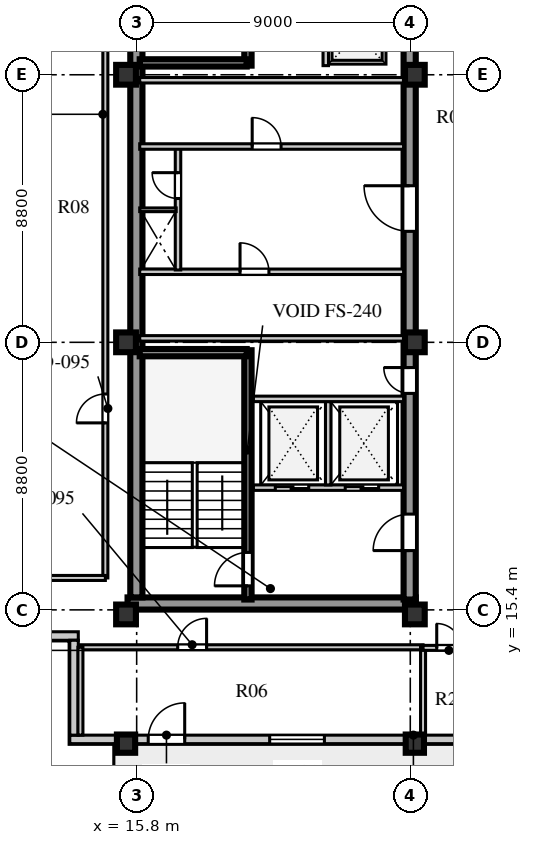
"""IFC4 building model, lengths in metres.
Left out: names, types, materials, properties, quantities, classifications, styles, units other than length and angle.
Written with IfcOpenShell. Run it as: python <this file> out.ifc"""

import sys

from ifc_helpers import new_model, si_unit, direction, frame, frame_2d, origin, origin_2d, place, context, subcontext, project, spatial, rectangle, extrude, element, fill, save


model = new_model("IFC4")
c1 = context("Model", 3, precision=1e-05, world=origin(), true_north=direction((0.0, 1.0)))
c2 = subcontext(c1, "Body", "Model", "MODEL_VIEW")
j1 = project(units=[si_unit("LENGTHUNIT", "METRE"), si_unit("PLANEANGLEUNIT", "RADIAN")], contexts=[c1])
p1 = place(None, origin())
s1 = spatial("IfcSite", under=j1, at=p1, CompositionType="ELEMENT")
p2 = place(p1, origin())
s2 = spatial("IfcBuilding", under=s1, at=p2, CompositionType="ELEMENT")
p3 = place(p2, frame((0.0, 0.0, 327.7)))
s3 = spatial("IfcBuildingStorey", under=s2, at=p3, CompositionType="ELEMENT", Elevation=327.7)
p4 = place(p3, frame((15.5, 15.61, 0.0), z_axis=(0.0, 0.0, 1.0), x_axis=(1.0, 0.0, 0.0)))
e1 = element("IfcWall", 1, at=p4, inside=s3, PredefinedType="SHEAR", context=c2, shape_type="SweptSolid", body=[
    extrude(rectangle(XDim=9.48, YDim=0.4, at=frame_2d((4.74, 0.0))), origin(), (0.0, 0.0, 1.0), 3.56),
])
p5 = place(p3, frame((15.79, 15.81, 0.0), z_axis=(0.0, 0.0, 1.0), x_axis=(0.0, 1.0, 0.0)))
e2 = element("IfcWall", 2, at=p5, inside=s3, PredefinedType="SHEAR", context=c2, shape_type="SweptSolid", body=[
    extrude(rectangle(XDim=25.63, YDim=0.4, at=frame_2d((12.815, 0.0))), origin(), (0.0, 0.0, 1.0), 3.56),
])
p6 = place(p3, frame((24.78, 15.74, 0.0), z_axis=(0.0, 0.0, 1.0), x_axis=(0.0, 1.0, 0.0)))
e3 = element("IfcWall", 3, at=p6, inside=s3, PredefinedType="SHEAR", context=c2, shape_type="SweptSolid", body=[
    extrude(rectangle(XDim=25.76, YDim=0.4, at=frame_2d((12.88, 0.0))), origin(), (0.0, 0.0, 1.0), 3.56),
])
p7 = place(p6, frame((1.61, 0.0, 0.0)))
e4 = element("IfcOpeningElement", 4, at=p7, cuts=e3, PredefinedType="OPENING", context=c2, shape_type="SweptSolid", body=[
    extrude(rectangle(XDim=1.2, YDim=2.1, at=frame_2d((0.6, 1.05))), frame((0.0, 0.21, 0.0), z_axis=(0.0, -1.0, 0.0), x_axis=(1.0, 0.0, 0.0)), (0.0, 0.0, 1.0), 0.42),
])
p8 = place(p6, frame((6.78, 0.0, 0.0)))
e5 = element("IfcOpeningElement", 5, at=p8, cuts=e3, PredefinedType="OPENING", context=c2, shape_type="SweptSolid", body=[
    extrude(rectangle(XDim=0.85, YDim=2.06, at=frame_2d((0.425, 1.03))), frame((0.0, 0.21, 0.0), z_axis=(0.0, -1.0, 0.0), x_axis=(1.0, 0.0, 0.0)), (0.0, 0.0, 1.0), 0.42),
])
p9 = place(p6, frame((12.11, 0.0, 0.0)))
e6 = element("IfcOpeningElement", 6, at=p9, cuts=e3, PredefinedType="OPENING", context=c2, shape_type="SweptSolid", body=[
    extrude(rectangle(XDim=1.5, YDim=2.12, at=frame_2d((0.75, 1.06))), frame((0.0, 0.21, 0.0), z_axis=(0.0, -1.0, 0.0), x_axis=(1.0, 0.0, 0.0)), (0.0, 0.0, 1.0), 0.42),
])
p10 = place(p6, frame((20.11, 0.0, 0.0)))
e7 = element("IfcOpeningElement", 7, at=p10, cuts=e3, PredefinedType="OPENING", context=c2, shape_type="SweptSolid", body=[
    extrude(rectangle(XDim=1.2, YDim=2.12, at=frame_2d((0.6, 1.06))), frame((0.0, 0.21, 0.0), z_axis=(0.0, -1.0, 0.0), x_axis=(1.0, 0.0, 0.0)), (0.0, 0.0, 1.0), 0.42),
])
p11 = place(p6, frame((24.01, 0.0, 0.0)))
e8 = element("IfcOpeningElement", 8, at=p11, cuts=e3, PredefinedType="OPENING", context=c2, shape_type="SweptSolid", body=[
    extrude(rectangle(XDim=0.95, YDim=2.1, at=frame_2d((0.475, 1.05))), frame((0.0, 0.21, 0.0), z_axis=(0.0, -1.0, 0.0), x_axis=(1.0, 0.0, 0.0)), (0.0, 0.0, 1.0), 0.42),
])
for number, where, z_axis, x_axis in (
    (9, (15.45, 15.25, 0.0), (0.0, 0.0, 1.0), (1.0, 0.0, 0.0)),
    (10, (15.45, 24.2, 0.0), (0.0, 0.0, 1.0), (1.0, 0.0, 0.0)),
    (11, (15.45, 33.0, 0.0), (0.0, 0.0, 1.0), (1.0, 0.0, 0.0)),
    (12, (24.95, 15.25, 0.0), (0.0, 0.0, 1.0), (1.0, 0.0, 0.0)),
    (13, (24.95, 24.2, 0.0), (0.0, 0.0, 1.0), (1.0, 0.0, 0.0)),
    (14, (24.95, 33.0, 0.0), (0.0, 0.0, 1.0), (1.0, 0.0, 0.0)),
):
    element("IfcColumn", number, at=place(p3, frame(where, z_axis=z_axis, x_axis=x_axis)), inside=s3, PredefinedType="COLUMN", context=c2, shape_type="SweptSolid", body=[
        extrude(rectangle(XDim=0.65, YDim=0.65, at=origin_2d()), origin(), (0.0, 0.0, 1.0), 3.56),
    ])
for number, where, z_axis, x_axis in (
    (15, (15.45, 11.0, 0.0), (0.0, 0.0, 1.0), (1.0, 0.0, 0.0)),
    (16, (24.95, 11.0, 0.0), (0.0, 0.0, 1.0), (1.0, 0.0, 0.0)),
):
    element("IfcColumn", number, at=place(p3, frame(where, z_axis=z_axis, x_axis=x_axis)), inside=s3, PredefinedType="COLUMN", context=c2, shape_type="SweptSolid", body=[
        extrude(rectangle(XDim=0.6, YDim=0.6, at=origin_2d()), origin(), (0.0, 0.0, 1.0), 3.56),
    ])
p12 = place(p3, frame((13.6, 11.14, 0.0), z_axis=(0.0, 0.0, 1.0), x_axis=(1.0, 0.0, 0.0)))
e17 = element("IfcWall", 17, at=p12, inside=s3, PredefinedType="STANDARD", context=c2, shape_type="SweptSolid", body=[
    extrude(rectangle(XDim=28.0, YDim=0.28, at=frame_2d((14.0, 0.0))), origin(), (0.0, 0.0, 1.0), 2.92),
])
p13 = place(p12, frame((2.58, 0.0, 0.0)))
e18 = element("IfcOpeningElement", 18, at=p13, cuts=e17, PredefinedType="OPENING", context=c2, shape_type="SweptSolid", body=[
    extrude(rectangle(XDim=1.2, YDim=2.05, at=frame_2d((0.6, 1.025))), frame((0.0, 0.15, 0.0), z_axis=(0.0, -1.0, 0.0), x_axis=(1.0, 0.0, 0.0)), (0.0, 0.0, 1.0), 0.3),
])
p14 = place(p12, frame((6.575, 0.0, 0.8)))
e19 = element("IfcOpeningElement", 19, at=p14, cuts=e17, PredefinedType="OPENING", context=c2, shape_type="SweptSolid", body=[
    extrude(rectangle(XDim=1.8, YDim=2.0, at=frame_2d((0.9, 1.0))), frame((0.0, 0.15, 0.0), z_axis=(0.0, -1.0, 0.0), x_axis=(1.0, 0.0, 0.0)), (0.0, 0.0, 1.0), 0.3),
])
p15 = place(p12, frame((14.23, 0.0, 0.8)))
e20 = element("IfcOpeningElement", 20, at=p15, cuts=e17, PredefinedType="OPENING", context=c2, shape_type="SweptSolid", body=[
    extrude(rectangle(XDim=1.5, YDim=2.0, at=frame_2d((0.75, 1.0))), frame((0.0, 0.15, 0.0), z_axis=(0.0, -1.0, 0.0), x_axis=(1.0, 0.0, 0.0)), (0.0, 0.0, 1.0), 0.3),
])
p16 = place(p12, frame((17.74, 0.0, 0.8)))
e21 = element("IfcOpeningElement", 21, at=p16, cuts=e17, PredefinedType="OPENING", context=c2, shape_type="SweptSolid", body=[
    extrude(rectangle(XDim=1.2, YDim=1.75, at=frame_2d((0.6, 0.875))), frame((0.0, 0.15, 0.0), z_axis=(0.0, -1.0, 0.0), x_axis=(1.0, 0.0, 0.0)), (0.0, 0.0, 1.0), 0.3),
])
p17 = place(p12, frame((22.965, 0.0, 0.8)))
e22 = element("IfcOpeningElement", 22, at=p17, cuts=e17, PredefinedType="OPENING", context=c2, shape_type="SweptSolid", body=[
    extrude(rectangle(XDim=2.4, YDim=2.05, at=frame_2d((1.2, 1.025))), frame((0.0, 0.15, 0.0), z_axis=(0.0, -1.0, 0.0), x_axis=(1.0, 0.0, 0.0)), (0.0, 0.0, 1.0), 0.3),
])
p18 = place(p3, frame((10.2, 14.54, 0.0), z_axis=(0.0, 0.0, 1.0), x_axis=(1.0, 0.0, 0.0)))
e23 = element("IfcWall", 23, at=p18, inside=s3, PredefinedType="STANDARD", context=c2, shape_type="SweptSolid", body=[
    extrude(rectangle(XDim=3.68, YDim=0.28, at=frame_2d((1.84, 0.0))), origin(), (0.0, 0.0, 1.0), 2.92),
])
p19 = place(p3, frame((13.74, 14.4, 0.0), z_axis=(0.0, 0.0, 1.0), x_axis=(0.0, -1.0, 0.0)))
e24 = element("IfcWall", 24, at=p19, inside=s3, PredefinedType="STANDARD", context=c2, shape_type="SweptSolid", body=[
    extrude(rectangle(XDim=3.12, YDim=0.28, at=frame_2d((1.56, 0.0))), origin(), (0.0, 0.0, 1.0), 2.92),
])
p20 = place(p3, frame((19.46, 15.74, 0.0), z_axis=(0.0, 0.0, 1.0), x_axis=(0.0, 1.0, 0.0)))
e25 = element("IfcWall", 25, at=p20, inside=s3, PredefinedType="SHEAR", context=c2, shape_type="SweptSolid", body=[
    extrude(rectangle(XDim=8.2, YDim=0.24, at=frame_2d((4.1, 0.0))), origin(), (0.0, 0.0, 1.0), 3.8),
])
p21 = place(p20, frame((0.45, 0.0, 0.0)))
e26 = element("IfcOpeningElement", 26, at=p21, cuts=e25, PredefinedType="OPENING", context=c2, shape_type="SweptSolid", body=[
    extrude(rectangle(XDim=1.1, YDim=2.1, at=frame_2d((0.55, 1.05))), frame((0.0, 0.13, 0.0), z_axis=(0.0, -1.0, 0.0), x_axis=(1.0, 0.0, 0.0)), (0.0, 0.0, 1.0), 0.26),
])
p22 = place(p3, frame((15.9, 23.86, 0.0), z_axis=(0.0, 0.0, 1.0), x_axis=(1.0, 0.0, 0.0)))
e27 = element("IfcWall", 27, at=p22, inside=s3, PredefinedType="SHEAR", context=c2, shape_type="SweptSolid", body=[
    extrude(rectangle(XDim=3.52, YDim=0.24, at=frame_2d((1.76, 0.0))), origin(), (0.0, 0.0, 1.0), 3.8),
])
p23 = place(p3, frame((19.64, 19.42, 0.0), z_axis=(0.0, 0.0, 1.0), x_axis=(1.0, 0.0, 0.0)))
e28 = element("IfcWall", 28, at=p23, inside=s3, PredefinedType="SOLIDWALL", context=c2, shape_type="SweptSolid", body=[
    extrude(rectangle(XDim=4.94, YDim=0.18, at=frame_2d((2.47, 0.0))), origin(), (0.0, 0.0, 1.0), 3.56),
])
p24 = place(p23, frame((0.72, 0.0, 0.0)))
e29 = element("IfcOpeningElement", 29, at=p24, cuts=e28, PredefinedType="OPENING", context=c2, shape_type="SweptSolid", body=[
    extrude(rectangle(XDim=1.1, YDim=2.1, at=frame_2d((0.55, 1.05))), frame((0.0, 0.1, 0.0), z_axis=(0.0, -1.0, 0.0), x_axis=(1.0, 0.0, 0.0)), (0.0, 0.0, 1.0), 0.2),
])
p25 = place(p23, frame((3.02, 0.0, 0.0)))
e30 = element("IfcOpeningElement", 30, at=p25, cuts=e28, PredefinedType="OPENING", context=c2, shape_type="SweptSolid", body=[
    extrude(rectangle(XDim=1.1, YDim=2.1, at=frame_2d((0.55, 1.05))), frame((0.0, 0.1, 0.0), z_axis=(0.0, -1.0, 0.0), x_axis=(1.0, 0.0, 0.0)), (0.0, 0.0, 1.0), 0.2),
])
p26 = place(p3, frame((22.1, 19.51, 0.0), z_axis=(0.0, 0.0, 1.0), x_axis=(0.0, 1.0, 0.0)))
e31 = element("IfcWall", 31, at=p26, inside=s3, PredefinedType="SOLIDWALL", context=c2, shape_type="SweptSolid", body=[
    extrude(rectangle(XDim=2.74, YDim=0.18, at=frame_2d((1.37, 0.0))), origin(), (0.0, 0.0, 1.0), 3.56),
])
p27 = place(p3, frame((19.64, 22.34, 0.0), z_axis=(0.0, 0.0, 1.0), x_axis=(1.0, 0.0, 0.0)))
e32 = element("IfcWall", 32, at=p27, inside=s3, PredefinedType="SOLIDWALL", context=c2, shape_type="SweptSolid", body=[
    extrude(rectangle(XDim=4.94, YDim=0.18, at=frame_2d((2.47, 0.0))), origin(), (0.0, 0.0, 1.0), 3.56),
])
p28 = place(p3, frame((15.9, 26.52, 0.0), z_axis=(0.0, 0.0, 1.0), x_axis=(1.0, 0.0, 0.0)))
e33 = element("IfcWall", 33, at=p28, inside=s3, PredefinedType="SOLIDWALL", context=c2, shape_type="SweptSolid", body=[
    extrude(rectangle(XDim=8.68, YDim=0.18, at=frame_2d((4.34, 0.0))), origin(), (0.0, 0.0, 1.0), 3.56),
])
p29 = place(p28, frame((3.3, 0.0, 0.0)))
e34 = element("IfcOpeningElement", 34, at=p29, cuts=e33, PredefinedType="OPENING", context=c2, shape_type="SweptSolid", body=[
    extrude(rectangle(XDim=0.95, YDim=2.1, at=frame_2d((0.475, 1.05))), frame((0.0, 0.1, 0.0), z_axis=(0.0, -1.0, 0.0), x_axis=(1.0, 0.0, 0.0)), (0.0, 0.0, 1.0), 0.2),
])
p30 = place(p3, frame((15.9, 24.33, 0.0), z_axis=(0.0, 0.0, 1.0), x_axis=(1.0, 0.0, 0.0)))
e35 = element("IfcWall", 35, at=p30, inside=s3, PredefinedType="SOLIDWALL", context=c2, shape_type="SweptSolid", body=[
    extrude(rectangle(XDim=8.68, YDim=0.18, at=frame_2d((4.34, 0.0))), origin(), (0.0, 0.0, 1.0), 2.96),
])
p31 = place(p3, frame((17.16, 26.58, 0.0), z_axis=(0.0, 0.0, 1.0), x_axis=(0.0, 1.0, 0.0)))
e36 = element("IfcWall", 36, at=p31, inside=s3, PredefinedType="SOLIDWALL", context=c2, shape_type="SweptSolid", body=[
    extrude(rectangle(XDim=4.02, YDim=0.18, at=frame_2d((2.01, 0.0))), origin(), (0.0, 0.0, 1.0), 3.56),
])
p32 = place(p31, frame((2.35, 0.0, 0.0)))
e37 = element("IfcOpeningElement", 37, at=p32, cuts=e36, PredefinedType="OPENING", context=c2, shape_type="SweptSolid", body=[
    extrude(rectangle(XDim=0.85, YDim=2.06, at=frame_2d((0.425, 1.03))), frame((0.0, 0.1, 0.0), z_axis=(0.0, -1.0, 0.0), x_axis=(1.0, 0.0, 0.0)), (0.0, 0.0, 1.0), 0.2),
])
p33 = place(p3, frame((15.9, 28.56, 0.0), z_axis=(0.0, 0.0, 1.0), x_axis=(1.0, 0.0, 0.0)))
e38 = element("IfcWall", 38, at=p33, inside=s3, PredefinedType="PARTITIONING", context=c2, shape_type="SweptSolid", body=[
    extrude(rectangle(XDim=1.2, YDim=0.12, at=frame_2d((0.6, 0.0))), origin(), (0.0, 0.0, 1.0), 3.56),
])
p34 = place(p3, frame((15.9, 30.64, 0.0), z_axis=(0.0, 0.0, 1.0), x_axis=(1.0, 0.0, 0.0)))
e39 = element("IfcWall", 39, at=p34, inside=s3, PredefinedType="SOLIDWALL", context=c2, shape_type="SweptSolid", body=[
    extrude(rectangle(XDim=8.68, YDim=0.18, at=frame_2d((4.34, 0.0))), origin(), (0.0, 0.0, 1.0), 3.56),
])
p35 = place(p34, frame((3.7, 0.0, 0.0)))
e40 = element("IfcOpeningElement", 40, at=p35, cuts=e39, PredefinedType="OPENING", context=c2, shape_type="SweptSolid", body=[
    extrude(rectangle(XDim=0.95, YDim=2.1, at=frame_2d((0.475, 1.05))), frame((0.0, 0.1, 0.0), z_axis=(0.0, -1.0, 0.0), x_axis=(1.0, 0.0, 0.0)), (0.0, 0.0, 1.0), 0.2),
])
p36 = place(p3, frame((15.9, 32.82, 0.0), z_axis=(0.0, 0.0, 1.0), x_axis=(1.0, 0.0, 0.0)))
e41 = element("IfcWall", 41, at=p36, inside=s3, PredefinedType="SOLIDWALL", context=c2, shape_type="SweptSolid", body=[
    extrude(rectangle(XDim=8.68, YDim=0.18, at=frame_2d((4.34, 0.0))), origin(), (0.0, 0.0, 1.0), 2.96),
])
p37 = place(p3, frame((19.46, 33.3, 0.0), z_axis=(0.0, 0.0, 1.0), x_axis=(0.0, 1.0, 0.0)))
e42 = element("IfcWall", 42, at=p37, inside=s3, PredefinedType="SHEAR", context=c2, shape_type="SweptSolid", body=[
    extrude(rectangle(XDim=8.18, YDim=0.24, at=frame_2d((4.09, 0.0))), origin(), (0.0, 0.0, 1.0), 3.8),
])
p38 = place(p37, frame((0.65, 0.0, 0.0)))
e43 = element("IfcOpeningElement", 43, at=p38, cuts=e42, PredefinedType="OPENING", context=c2, shape_type="SweptSolid", body=[
    extrude(rectangle(XDim=1.1, YDim=2.1, at=frame_2d((0.55, 1.05))), frame((0.0, 0.13, 0.0), z_axis=(0.0, -1.0, 0.0), x_axis=(1.0, 0.0, 0.0)), (0.0, 0.0, 1.0), 0.26),
])
p39 = place(p3, frame((15.9, 33.39, 0.0), z_axis=(0.0, 0.0, 1.0), x_axis=(1.0, 0.0, 0.0)))
e44 = element("IfcWall", 44, at=p39, inside=s3, PredefinedType="SHEAR", context=c2, shape_type="SweptSolid", body=[
    extrude(rectangle(XDim=3.52, YDim=0.24, at=frame_2d((1.76, 0.0))), origin(), (0.0, 0.0, 1.0), 3.8),
])
p40 = place(p3, frame((22.02, 33.3, 0.0), z_axis=(0.0, 0.0, 1.0), x_axis=(0.0, 1.0, 0.0)))
e45 = element("IfcWall", 45, at=p40, inside=s3, PredefinedType="SOLIDWALL", context=c2, shape_type="SweptSolid", body=[
    extrude(rectangle(XDim=2.01, YDim=0.18, at=frame_2d((1.005, 0.0))), origin(), (0.0, 0.0, 1.0), 3.56),
])
p41 = place(p3, frame((13.95, 14.17, 0.0), z_axis=(0.0, 0.0, 1.0), x_axis=(1.0, 0.0, 0.0)))
e46 = element("IfcWall", 46, at=p41, inside=s3, PredefinedType="PARTITIONING", context=c2, shape_type="SweptSolid", body=[
    extrude(rectangle(XDim=11.27, YDim=0.165, at=frame_2d((5.635, 0.0))), origin(), (0.0, 0.0, 1.0), 3.56),
])
p42 = place(p41, frame((3.2, 0.0, 0.0)))
e47 = element("IfcOpeningElement", 47, at=p42, cuts=e46, PredefinedType="OPENING", context=c2, shape_type="SweptSolid", body=[
    extrude(rectangle(XDim=0.95, YDim=2.08, at=frame_2d((0.475, 1.04))), frame((0.0, 0.093, 0.0), z_axis=(0.0, -1.0, 0.0), x_axis=(1.0, 0.0, 0.0)), (0.0, 0.0, 1.0), 0.185),
])
p43 = place(p3, frame((13.95, 11.28, 0.0), z_axis=(0.0, 0.0, 1.0), x_axis=(0.0, 1.0, 0.0)))
e48 = element("IfcWall", 48, at=p43, inside=s3, PredefinedType="PARTITIONING", context=c2, shape_type="SweptSolid", body=[
    extrude(rectangle(XDim=2.89, YDim=0.165, at=frame_2d((1.445, 0.0))), origin(), (0.0, 0.0, 1.0), 3.56),
])
p44 = place(p3, frame((25.22, 11.28, 0.0), z_axis=(0.0, 0.0, 1.0), x_axis=(0.0, 1.0, 0.0)))
e49 = element("IfcWall", 49, at=p44, inside=s3, PredefinedType="PARTITIONING", context=c2, shape_type="SweptSolid", body=[
    extrude(rectangle(XDim=2.89, YDim=0.165, at=frame_2d((1.445, 0.0))), origin(), (0.0, 0.0, 1.0), 3.11),
])
p45 = place(p3, frame((14.77, 16.45, 0.0), z_axis=(0.0, 0.0, 1.0), x_axis=(0.0, 1.0, 0.0)))
e50 = element("IfcWall", 50, at=p45, inside=s3, PredefinedType="PARTITIONING", context=c2, shape_type="SweptSolid", body=[
    extrude(rectangle(XDim=24.3, YDim=0.165, at=frame_2d((12.15, 0.0))), origin(), (0.0, 0.0, 1.0), 3.56),
])
p46 = place(p45, frame((5.1, 0.0, 0.0)))
e51 = element("IfcOpeningElement", 51, at=p46, cuts=e50, PredefinedType="OPENING", context=c2, shape_type="SweptSolid", body=[
    extrude(rectangle(XDim=0.95, YDim=2.08, at=frame_2d((0.475, 1.04))), frame((0.0, 0.093, 0.0), z_axis=(0.0, -1.0, 0.0), x_axis=(1.0, 0.0, 0.0)), (0.0, 0.0, 1.0), 0.185),
])
p47 = place(p3, frame((10.48, 16.45, 0.0), z_axis=(0.0, 0.0, 1.0), x_axis=(1.0, 0.0, 0.0)))
e52 = element("IfcWall", 52, at=p47, inside=s3, PredefinedType="PARTITIONING", context=c2, shape_type="SweptSolid", body=[
    extrude(rectangle(XDim=4.29, YDim=0.165, at=frame_2d((2.145, 0.0))), origin(), (0.0, 0.0, 1.0), 3.56),
])
p48 = place(p3, frame((25.22, 14.15, 0.0), z_axis=(0.0, 0.0, 1.0), x_axis=(1.0, 0.0, 0.0)))
e53 = element("IfcWall", 53, at=p48, inside=s3, PredefinedType="PARTITIONING", context=c2, shape_type="SweptSolid", body=[
    extrude(rectangle(XDim=1.86, YDim=0.165, at=frame_2d((0.93, 0.0))), origin(), (0.0, 0.0, 1.0), 3.56),
])
p49 = place(p48, frame((0.45, 0.0, 0.0)))
e54 = element("IfcOpeningElement", 54, at=p49, cuts=e53, PredefinedType="OPENING", context=c2, shape_type="SweptSolid", body=[
    extrude(rectangle(XDim=0.8, YDim=2.05, at=frame_2d((0.4, 1.025))), frame((0.0, 0.093, 0.0), z_axis=(0.0, -1.0, 0.0), x_axis=(1.0, 0.0, 0.0)), (0.0, 0.0, 1.0), 0.185),
])
p50 = place(p13, frame((1.2, 0.0, 0.0), z_axis=(0.0, 0.0, 1.0), x_axis=(-1.0, 0.0, 0.0)))
e55 = element("IfcDoor", 55, at=p50, inside=s3, OperationType="SINGLE_SWING_LEFT", PredefinedType="DOOR", context=c2, shape_type="SweptSolid", body=[
    extrude(rectangle(XDim=1.2, YDim=2.05, at=frame_2d((0.6, 1.025))), frame((0.0, 0.025, 0.0), z_axis=(0.0, -1.0, 0.0), x_axis=(1.0, 0.0, 0.0)), (0.0, 0.0, 1.0), 0.05),
])
fill(e18, e55)
p51 = place(p14, origin())
e56 = element("IfcWindow", 56, at=p51, inside=s3, PartitioningType="SINGLE_PANEL", PredefinedType="WINDOW", context=c2, shape_type="SweptSolid", body=[
    extrude(rectangle(XDim=1.8, YDim=2.0, at=frame_2d((0.9, 1.0))), frame((0.0, 0.03, 0.0), z_axis=(0.0, -1.0, 0.0), x_axis=(1.0, 0.0, 0.0)), (0.0, 0.0, 1.0), 0.06),
])
fill(e19, e56)
p52 = place(p21, origin())
e57 = element("IfcDoor", 57, at=p52, inside=s3, OperationType="SINGLE_SWING_LEFT", PredefinedType="DOOR", context=c2, shape_type="SweptSolid", body=[
    extrude(rectangle(XDim=1.1, YDim=2.1, at=frame_2d((0.55, 1.05))), frame((0.0, 0.025, 0.0), z_axis=(0.0, -1.0, 0.0), x_axis=(1.0, 0.0, 0.0)), (0.0, 0.0, 1.0), 0.05),
])
fill(e26, e57)
p53 = place(p24, origin())
e58 = element("IfcDoor", 58, at=p53, inside=s3, OperationType="DOUBLE_DOOR_SLIDING", PredefinedType="DOOR", context=c2, shape_type="SweptSolid", body=[
    extrude(rectangle(XDim=1.1, YDim=2.1, at=frame_2d((0.55, 1.05))), frame((0.0, 0.025, 0.0), z_axis=(0.0, -1.0, 0.0), x_axis=(1.0, 0.0, 0.0)), (0.0, 0.0, 1.0), 0.05),
])
fill(e29, e58)
p54 = place(p25, origin())
e59 = element("IfcDoor", 59, at=p54, inside=s3, OperationType="DOUBLE_DOOR_SLIDING", PredefinedType="DOOR", context=c2, shape_type="SweptSolid", body=[
    extrude(rectangle(XDim=1.1, YDim=2.1, at=frame_2d((0.55, 1.05))), frame((0.0, 0.025, 0.0), z_axis=(0.0, -1.0, 0.0), x_axis=(1.0, 0.0, 0.0)), (0.0, 0.0, 1.0), 0.05),
])
fill(e30, e59)
p55 = place(p7, frame((1.2, 0.0, 0.0), z_axis=(0.0, 0.0, 1.0), x_axis=(-1.0, 0.0, 0.0)))
e60 = element("IfcDoor", 60, at=p55, inside=s3, OperationType="SINGLE_SWING_RIGHT", PredefinedType="DOOR", context=c2, shape_type="SweptSolid", body=[
    extrude(rectangle(XDim=1.2, YDim=2.1, at=frame_2d((0.6, 1.05))), frame((0.0, 0.025, 0.0), z_axis=(0.0, -1.0, 0.0), x_axis=(1.0, 0.0, 0.0)), (0.0, 0.0, 1.0), 0.05),
])
fill(e4, e60)
p56 = place(p8, frame((0.85, 0.0, 0.0), z_axis=(0.0, 0.0, 1.0), x_axis=(-1.0, 0.0, 0.0)))
e61 = element("IfcDoor", 61, at=p56, inside=s3, OperationType="SINGLE_SWING_LEFT", PredefinedType="DOOR", context=c2, shape_type="SweptSolid", body=[
    extrude(rectangle(XDim=0.85, YDim=2.06, at=frame_2d((0.425, 1.03))), frame((0.0, 0.025, 0.0), z_axis=(0.0, -1.0, 0.0), x_axis=(1.0, 0.0, 0.0)), (0.0, 0.0, 1.0), 0.05),
])
fill(e5, e61)
p57 = place(p29, origin())
e62 = element("IfcDoor", 62, at=p57, inside=s3, OperationType="SINGLE_SWING_LEFT", PredefinedType="DOOR", context=c2, shape_type="SweptSolid", body=[
    extrude(rectangle(XDim=0.95, YDim=2.1, at=frame_2d((0.475, 1.05))), frame((0.0, 0.025, 0.0), z_axis=(0.0, -1.0, 0.0), x_axis=(1.0, 0.0, 0.0)), (0.0, 0.0, 1.0), 0.05),
])
fill(e34, e62)
p58 = place(p32, origin())
e63 = element("IfcDoor", 63, at=p58, inside=s3, OperationType="SINGLE_SWING_RIGHT", PredefinedType="DOOR", context=c2, shape_type="SweptSolid", body=[
    extrude(rectangle(XDim=0.85, YDim=2.06, at=frame_2d((0.425, 1.03))), frame((0.0, 0.025, 0.0), z_axis=(0.0, -1.0, 0.0), x_axis=(1.0, 0.0, 0.0)), (0.0, 0.0, 1.0), 0.05),
])
fill(e37, e63)
p59 = place(p9, frame((1.5, 0.0, 0.0), z_axis=(0.0, 0.0, 1.0), x_axis=(-1.0, 0.0, 0.0)))
e64 = element("IfcDoor", 64, at=p59, inside=s3, OperationType="SINGLE_SWING_LEFT", PredefinedType="DOOR", context=c2, shape_type="SweptSolid", body=[
    extrude(rectangle(XDim=1.5, YDim=2.12, at=frame_2d((0.75, 1.06))), frame((0.0, 0.025, 0.0), z_axis=(0.0, -1.0, 0.0), x_axis=(1.0, 0.0, 0.0)), (0.0, 0.0, 1.0), 0.05),
])
fill(e6, e64)
p60 = place(p35, frame((0.95, 0.0, 0.0), z_axis=(0.0, 0.0, 1.0), x_axis=(-1.0, 0.0, 0.0)))
e65 = element("IfcDoor", 65, at=p60, inside=s3, OperationType="SINGLE_SWING_RIGHT", PredefinedType="DOOR", context=c2, shape_type="SweptSolid", body=[
    extrude(rectangle(XDim=0.95, YDim=2.1, at=frame_2d((0.475, 1.05))), frame((0.0, 0.025, 0.0), z_axis=(0.0, -1.0, 0.0), x_axis=(1.0, 0.0, 0.0)), (0.0, 0.0, 1.0), 0.05),
])
fill(e40, e65)
p61 = place(p42, frame((0.95, 0.0, 0.0), z_axis=(0.0, 0.0, 1.0), x_axis=(-1.0, 0.0, 0.0)))
e66 = element("IfcDoor", 66, at=p61, inside=s3, OperationType="SINGLE_SWING_LEFT", PredefinedType="DOOR", context=c2, shape_type="SweptSolid", body=[
    extrude(rectangle(XDim=0.95, YDim=2.08, at=frame_2d((0.475, 1.04))), frame((0.0, 0.025, 0.0), z_axis=(0.0, -1.0, 0.0), x_axis=(1.0, 0.0, 0.0)), (0.0, 0.0, 1.0), 0.05),
])
fill(e47, e66)
p62 = place(p46, origin())
e67 = element("IfcDoor", 67, at=p62, inside=s3, OperationType="SINGLE_SWING_LEFT", PredefinedType="DOOR", context=c2, shape_type="SweptSolid", body=[
    extrude(rectangle(XDim=0.95, YDim=2.08, at=frame_2d((0.475, 1.04))), frame((0.0, 0.025, 0.0), z_axis=(0.0, -1.0, 0.0), x_axis=(1.0, 0.0, 0.0)), (0.0, 0.0, 1.0), 0.05),
])
fill(e51, e67)
p63 = place(p49, origin())
e68 = element("IfcDoor", 68, at=p63, inside=s3, OperationType="SINGLE_SWING_LEFT", PredefinedType="DOOR", context=c2, shape_type="SweptSolid", body=[
    extrude(rectangle(XDim=0.8, YDim=2.05, at=frame_2d((0.4, 1.025))), frame((0.0, 0.025, 0.0), z_axis=(0.0, -1.0, 0.0), x_axis=(1.0, 0.0, 0.0)), (0.0, 0.0, 1.0), 0.05),
])
fill(e54, e68)
save(model, sys.argv[1])
